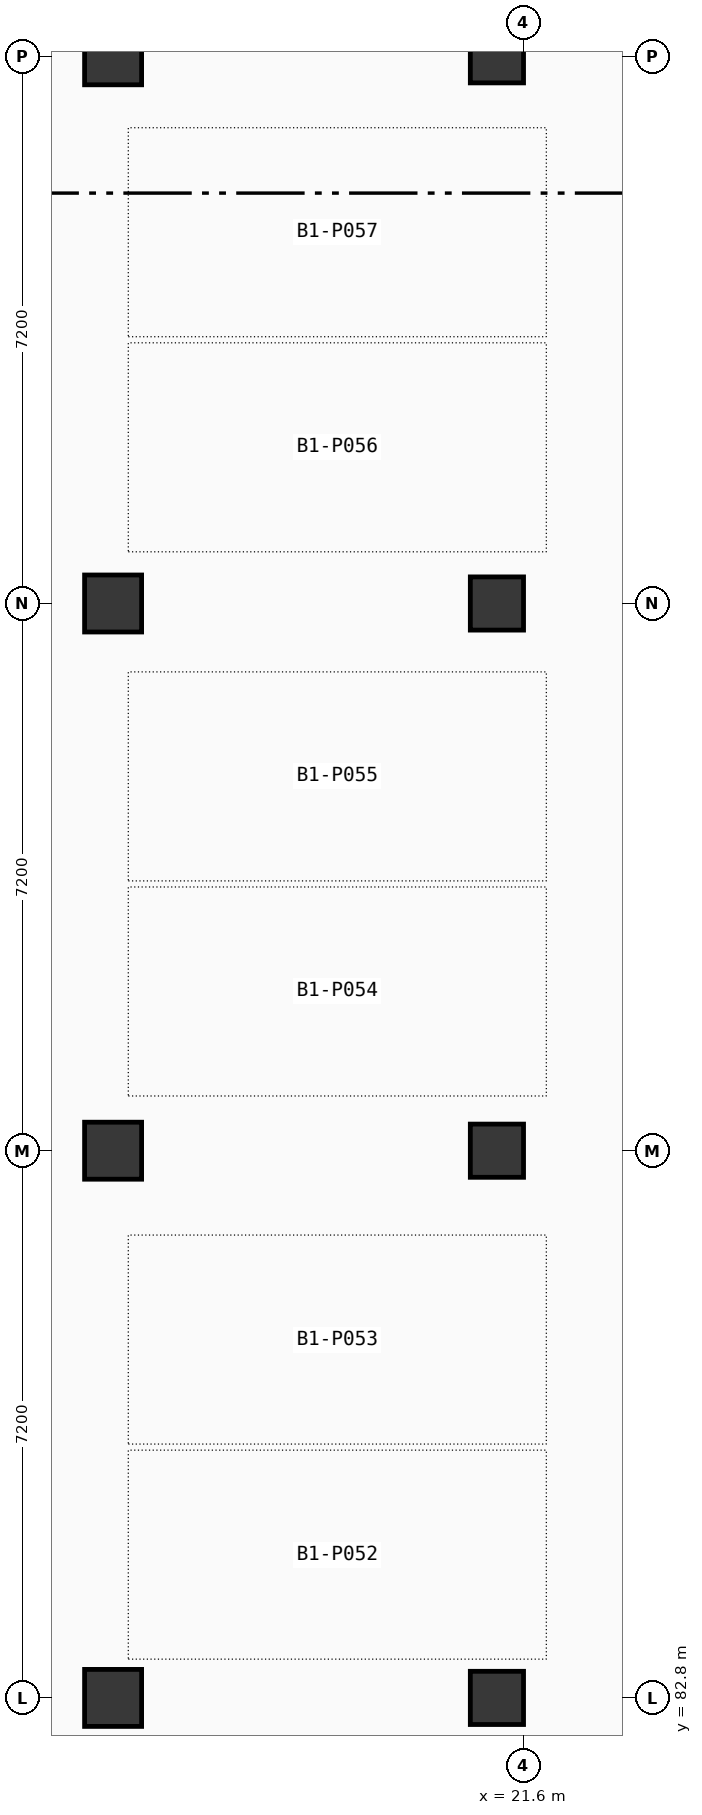
"""IFC4 building model, lengths in metres.
Left out: names, types, materials, properties, quantities, classifications, styles, units other than length and angle.
Written with IfcOpenShell. Run it as: python <this file> out.ifc"""

import sys

from ifc_helpers import new_model, si_unit, direction, frame, origin, origin_2d, place, context, subcontext, project, spatial, rectangle, extrude, element, save


model = new_model("IFC4")
c1 = context("Model", 3, precision=1e-05, world=origin(), true_north=direction((0.0, 1.0)))
c2 = subcontext(c1, "Body", "Model", "MODEL_VIEW")
j1 = project(units=[si_unit("LENGTHUNIT", "METRE"), si_unit("PLANEANGLEUNIT", "RADIAN")], contexts=[c1])
p1 = place(None, origin())
s1 = spatial("IfcSite", under=j1, at=p1, CompositionType="ELEMENT")
p2 = place(p1, origin())
s2 = spatial("IfcBuilding", under=s1, at=p2, CompositionType="ELEMENT")
p3 = place(p2, frame((0.0, 0.0, -4.2)))
s3 = spatial("IfcBuildingStorey", under=s2, at=p3, CompositionType="ELEMENT", Elevation=-4.2)
for number, where, z_axis, x_axis in (
    (1, (16.2, 82.8, 0.0), (0.0, 0.0, 1.0), (1.0, 0.0, 0.0)),
    (2, (16.2, 90.0, 0.0), (0.0, 0.0, 1.0), (1.0, 0.0, 0.0)),
    (3, (16.2, 97.2, 0.0), (0.0, 0.0, 1.0), (1.0, 0.0, 0.0)),
    (4, (16.2, 104.4, 0.0), (0.0, 0.0, 1.0), (1.0, 0.0, 0.0)),
):
    element("IfcColumn", number, at=place(p3, frame(where, z_axis=z_axis, x_axis=x_axis)), inside=s3, PredefinedType="COLUMN", context=c2, shape_type="SweptSolid", body=[
        extrude(rectangle(XDim=0.75, YDim=0.75, at=origin_2d()), origin(), (0.0, 0.0, 1.0), 4.2),
    ])
for number, where, z_axis, x_axis in (
    (5, (21.25, 82.8, 0.0), (0.0, 0.0, 1.0), (1.0, 0.0, 0.0)),
    (6, (21.25, 90.0, 0.0), (0.0, 0.0, 1.0), (1.0, 0.0, 0.0)),
    (7, (21.25, 97.2, 0.0), (0.0, 0.0, 1.0), (1.0, 0.0, 0.0)),
    (8, (21.25, 104.4, 0.0), (0.0, 0.0, 1.0), (1.0, 0.0, 0.0)),
):
    element("IfcColumn", number, at=place(p3, frame(where, z_axis=z_axis, x_axis=x_axis)), inside=s3, PredefinedType="COLUMN", context=c2, shape_type="SweptSolid", body=[
        extrude(rectangle(XDim=0.7, YDim=0.7, at=origin_2d()), origin(), (0.0, 0.0, 1.0), 4.2),
    ])
save(model, sys.argv[1])
